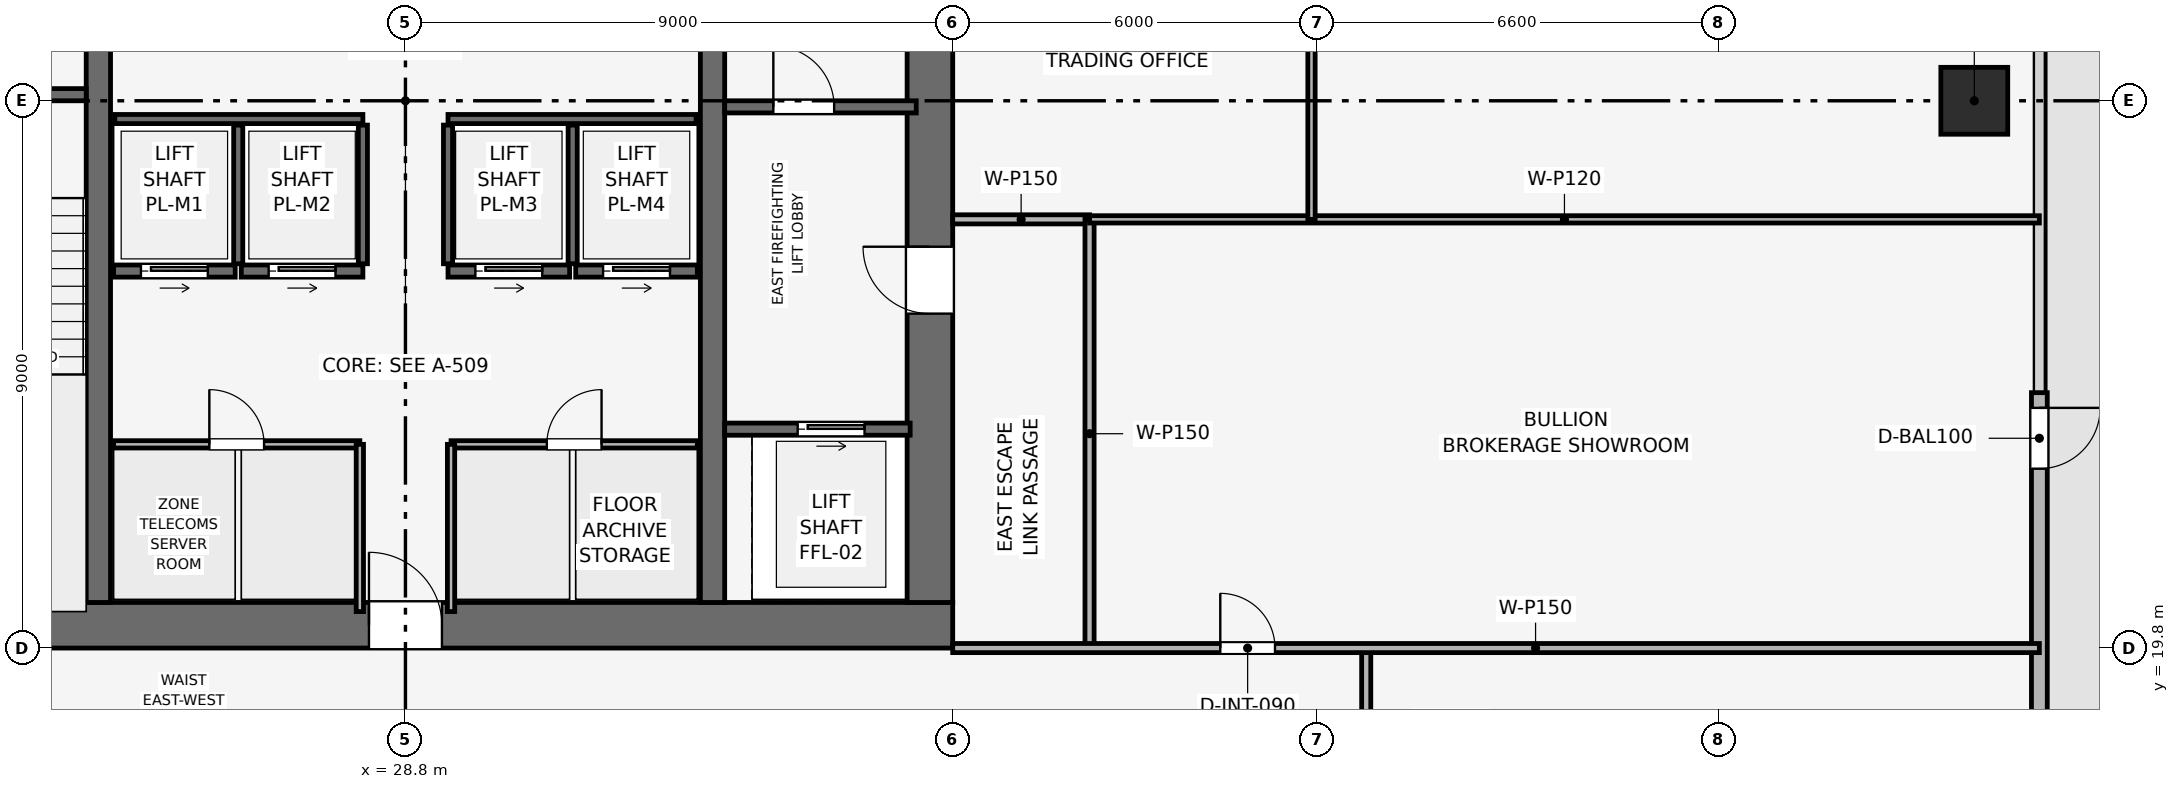
"""IFC4 building model, lengths in metres.
Left out: names, types, materials, properties, quantities, classifications, styles, units other than length and angle.
Written with IfcOpenShell. Run it as: python <this file> out.ifc"""

import sys

from ifc_helpers import new_model, si_unit, direction, frame, frame_2d, origin, origin_2d, place, context, subcontext, project, spatial, rectangle, extrude, element, fill, save


model = new_model("IFC4")
c1 = context("Model", 3, precision=1e-05, world=origin(), true_north=direction((0.0, 1.0)))
c2 = subcontext(c1, "Body", "Model", "MODEL_VIEW")
j1 = project(units=[si_unit("LENGTHUNIT", "METRE"), si_unit("PLANEANGLEUNIT", "RADIAN")], contexts=[c1])
p1 = place(None, origin())
s1 = spatial("IfcSite", under=j1, at=p1, CompositionType="ELEMENT")
p2 = place(p1, origin())
s2 = spatial("IfcBuilding", under=s1, at=p2, CompositionType="ELEMENT")
p3 = place(p2, frame((0.0, 0.0, 229.95)))
s3 = spatial("IfcBuildingStorey", under=s2, at=p3, CompositionType="ELEMENT", Elevation=229.95)
p4 = place(p3, frame((19.8, 20.175, 0.0), z_axis=(0.0, 0.0, 1.0), x_axis=(1.0, 0.0, 0.0)))
e1 = element("IfcWall", 1, at=p4, inside=s3, PredefinedType="SHEAR", context=c2, shape_type="SweptSolid", body=[
    extrude(rectangle(XDim=18.0, YDim=0.75, at=frame_2d((9.0, 0.0))), origin(), (0.0, 0.0, 1.0), 3.75),
])
p5 = place(p4, frame((8.4, 0.0, 0.0)))
e2 = element("IfcOpeningElement", 2, at=p5, cuts=e1, PredefinedType="OPENING", context=c2, shape_type="SweptSolid", body=[
    extrude(rectangle(XDim=1.2, YDim=2.2, at=frame_2d((0.6, 1.1))), frame((0.0, 0.385, 0.0), z_axis=(0.0, -1.0, 0.0), x_axis=(1.0, 0.0, 0.0)), (0.0, 0.0, 1.0), 0.77),
])
p6 = place(p3, frame((37.425, 20.55, 0.0), z_axis=(0.0, 0.0, 1.0), x_axis=(0.0, 1.0, 0.0)))
e3 = element("IfcWall", 3, at=p6, inside=s3, PredefinedType="SHEAR", context=c2, shape_type="SweptSolid", body=[
    extrude(rectangle(XDim=16.5, YDim=0.75, at=frame_2d((8.25, 0.0))), origin(), (0.0, 0.0, 1.0), 3.75),
])
p7 = place(p6, frame((4.75, 0.0, 0.0)))
e4 = element("IfcOpeningElement", 4, at=p7, cuts=e3, PredefinedType="OPENING", context=c2, shape_type="SweptSolid", body=[
    extrude(rectangle(XDim=1.1, YDim=2.15, at=frame_2d((0.55, 1.075))), frame((0.0, 0.385, 0.0), z_axis=(0.0, -1.0, 0.0), x_axis=(1.0, 0.0, 0.0)), (0.0, 0.0, 1.0), 0.77),
])
for number, where, z_axis, x_axis in (
    (5, (23.75, 20.55, 0.0), (0.0, 0.0, 1.0), (0.0, 1.0, 0.0)),
    (6, (33.85, 20.55, 0.0), (0.0, 0.0, 1.0), (0.0, 1.0, 0.0)),
):
    element("IfcWall", number, at=place(p3, frame(where, z_axis=z_axis, x_axis=x_axis)), inside=s3, PredefinedType="SHEAR", context=c2, shape_type="SweptSolid", body=[
        extrude(rectangle(XDim=16.5, YDim=0.4, at=frame_2d((8.25, 0.0))), origin(), (0.0, 0.0, 1.0), 3.75),
    ])
p8 = place(p3, frame((54.6, 28.8, 0.003), z_axis=(0.0, 0.0, 1.0), x_axis=(1.0, 0.0, 0.0)))
e7 = element("IfcColumn", 7, at=p8, inside=s3, PredefinedType="COLUMN", context=c2, shape_type="SweptSolid", body=[
    extrude(rectangle(XDim=1.1, YDim=1.1, at=origin_2d()), origin(), (0.0, 0.0, 1.0), 3.494),
])
p9 = place(p3, frame((55.67, 24.0, 0.0), z_axis=(0.0, 0.0, 1.0), x_axis=(0.0, -1.0, 0.0)))
e8 = element("IfcWall", 8, at=p9, inside=s3, PredefinedType="SOLIDWALL", context=c2, shape_type="SweptSolid", body=[
    extrude(rectangle(XDim=14.7, YDim=0.26, at=frame_2d((7.35, 0.0))), origin(), (0.0, 0.0, 1.0), 3.5),
])
p10 = place(p9, frame((0.25, 0.0, 0.0)))
e9 = element("IfcOpeningElement", 9, at=p10, cuts=e8, PredefinedType="OPENING", context=c2, shape_type="SweptSolid", body=[
    extrude(rectangle(XDim=1.0, YDim=2.2, at=frame_2d((0.5, 1.1))), frame((0.0, 0.14, 0.0), z_axis=(0.0, -1.0, 0.0), x_axis=(1.0, 0.0, 0.0)), (0.0, 0.0, 1.0), 0.28),
])
p11 = place(p3, frame((20.4, 28.9, 0.0), z_axis=(0.0, 0.0, 1.0), x_axis=(1.0, 0.0, 0.0)))
e10 = element("IfcWall", 10, at=p11, inside=s3, PredefinedType="SHEAR", context=c2, shape_type="SweptSolid", body=[
    extrude(rectangle(XDim=3.15, YDim=0.2, at=frame_2d((1.575, 0.0))), origin(), (0.0, 0.0, 1.0), 3.5),
])
p12 = place(p11, frame((0.8, 0.0, 0.0)))
e11 = element("IfcOpeningElement", 11, at=p12, cuts=e10, PredefinedType="OPENING", context=c2, shape_type="SweptSolid", body=[
    extrude(rectangle(XDim=1.0, YDim=2.1, at=frame_2d((0.5, 1.05))), frame((0.0, 0.11, 0.0), z_axis=(0.0, -1.0, 0.0), x_axis=(1.0, 0.0, 0.0)), (0.0, 0.0, 1.0), 0.22),
])
p13 = place(p3, frame((34.05, 28.7, 0.0), z_axis=(0.0, 0.0, 1.0), x_axis=(1.0, 0.0, 0.0)))
e12 = element("IfcWall", 12, at=p13, inside=s3, PredefinedType="SHEAR", context=c2, shape_type="SweptSolid", body=[
    extrude(rectangle(XDim=3.15, YDim=0.2, at=frame_2d((1.575, 0.0))), origin(), (0.0, 0.0, 1.0), 3.5),
])
p14 = place(p13, frame((0.8, 0.0, 0.0)))
e13 = element("IfcOpeningElement", 13, at=p14, cuts=e12, PredefinedType="OPENING", context=c2, shape_type="SweptSolid", body=[
    extrude(rectangle(XDim=1.0, YDim=2.1, at=frame_2d((0.5, 1.05))), frame((0.0, 0.11, 0.0), z_axis=(0.0, -1.0, 0.0), x_axis=(1.0, 0.0, 0.0)), (0.0, 0.0, 1.0), 0.22),
])
p15 = place(p3, frame((34.05, 23.4, 0.0), z_axis=(0.0, 0.0, 1.0), x_axis=(1.0, 0.0, 0.0)))
e14 = element("IfcWall", 14, at=p15, inside=s3, PredefinedType="SHEAR", context=c2, shape_type="SweptSolid", body=[
    extrude(rectangle(XDim=3.05, YDim=0.2, at=frame_2d((1.525, 0.0))), origin(), (0.0, 0.0, 1.0), 3.5),
])
p16 = place(p15, frame((1.2, 0.0, 0.0)))
e15 = element("IfcOpeningElement", 15, at=p16, cuts=e14, PredefinedType="OPENING", context=c2, shape_type="SweptSolid", body=[
    extrude(rectangle(XDim=1.1, YDim=2.15, at=frame_2d((0.55, 1.075))), frame((0.0, 0.11, 0.0), z_axis=(0.0, -1.0, 0.0), x_axis=(1.0, 0.0, 0.0)), (0.0, 0.0, 1.0), 0.22),
])
p17 = place(p3, frame((24.0, 26.0, 0.0), z_axis=(0.0, 0.0, 1.0), x_axis=(1.0, 0.0, 0.0)))
e16 = element("IfcWall", 16, at=p17, inside=s3, PredefinedType="SHEAR", context=c2, shape_type="SweptSolid", body=[
    extrude(rectangle(XDim=2.0, YDim=0.2, at=frame_2d((1.0, 0.0))), origin(), (0.0, 0.0, 1.0), 3.5),
])
p18 = place(p17, frame((0.45, 0.0, 0.0)))
e17 = element("IfcOpeningElement", 17, at=p18, cuts=e16, PredefinedType="OPENING", context=c2, shape_type="SweptSolid", body=[
    extrude(rectangle(XDim=1.1, YDim=2.15, at=frame_2d((0.55, 1.075))), frame((0.0, 0.11, 0.0), z_axis=(0.0, -1.0, 0.0), x_axis=(1.0, 0.0, 0.0)), (0.0, 0.0, 1.0), 0.22),
])
p19 = place(p3, frame((26.1, 26.0, 0.0), z_axis=(0.0, 0.0, 1.0), x_axis=(1.0, 0.0, 0.0)))
e18 = element("IfcWall", 18, at=p19, inside=s3, PredefinedType="SHEAR", context=c2, shape_type="SweptSolid", body=[
    extrude(rectangle(XDim=2.0, YDim=0.2, at=frame_2d((1.0, 0.0))), origin(), (0.0, 0.0, 1.0), 3.5),
])
p20 = place(p19, frame((0.45, 0.0, 0.0)))
e19 = element("IfcOpeningElement", 19, at=p20, cuts=e18, PredefinedType="OPENING", context=c2, shape_type="SweptSolid", body=[
    extrude(rectangle(XDim=1.1, YDim=2.15, at=frame_2d((0.55, 1.075))), frame((0.0, 0.11, 0.0), z_axis=(0.0, -1.0, 0.0), x_axis=(1.0, 0.0, 0.0)), (0.0, 0.0, 1.0), 0.22),
])
p21 = place(p3, frame((29.5, 26.0, 0.0), z_axis=(0.0, 0.0, 1.0), x_axis=(1.0, 0.0, 0.0)))
e20 = element("IfcWall", 20, at=p21, inside=s3, PredefinedType="SHEAR", context=c2, shape_type="SweptSolid", body=[
    extrude(rectangle(XDim=2.0, YDim=0.2, at=frame_2d((1.0, 0.0))), origin(), (0.0, 0.0, 1.0), 3.5),
])
p22 = place(p21, frame((0.45, 0.0, 0.0)))
e21 = element("IfcOpeningElement", 21, at=p22, cuts=e20, PredefinedType="OPENING", context=c2, shape_type="SweptSolid", body=[
    extrude(rectangle(XDim=1.1, YDim=2.15, at=frame_2d((0.55, 1.075))), frame((0.0, 0.11, 0.0), z_axis=(0.0, -1.0, 0.0), x_axis=(1.0, 0.0, 0.0)), (0.0, 0.0, 1.0), 0.22),
])
p23 = place(p3, frame((31.6, 26.0, 0.0), z_axis=(0.0, 0.0, 1.0), x_axis=(1.0, 0.0, 0.0)))
e22 = element("IfcWall", 22, at=p23, inside=s3, PredefinedType="SHEAR", context=c2, shape_type="SweptSolid", body=[
    extrude(rectangle(XDim=2.0, YDim=0.2, at=frame_2d((1.0, 0.0))), origin(), (0.0, 0.0, 1.0), 3.5),
])
p24 = place(p23, frame((0.45, 0.0, 0.0)))
e23 = element("IfcOpeningElement", 23, at=p24, cuts=e22, PredefinedType="OPENING", context=c2, shape_type="SweptSolid", body=[
    extrude(rectangle(XDim=1.1, YDim=2.15, at=frame_2d((0.55, 1.075))), frame((0.0, 0.11, 0.0), z_axis=(0.0, -1.0, 0.0), x_axis=(1.0, 0.0, 0.0)), (0.0, 0.0, 1.0), 0.22),
])
for number, where, z_axis, x_axis in (
    (24, (24.02, 28.5, 0.0), (0.0, 0.0, 1.0), (1.0, 0.0, 0.0)),
    (25, (29.5, 28.5, 0.0), (0.0, 0.0, 1.0), (1.0, 0.0, 0.0)),
):
    element("IfcWall", number, at=place(p3, frame(where, z_axis=z_axis, x_axis=x_axis)), inside=s3, PredefinedType="SHEAR", context=c2, shape_type="SweptSolid", body=[
        extrude(rectangle(XDim=4.08, YDim=0.15, at=frame_2d((2.04, 0.0))), origin(), (0.0, 0.0, 1.0), 3.5),
    ])
for number, where, z_axis, x_axis in (
    (26, (26.05, 26.12, 0.0), (0.0, 0.0, 1.0), (0.0, 1.0, 0.0)),
    (27, (28.1, 26.12, 0.0), (0.0, 0.0, 1.0), (0.0, 1.0, 0.0)),
    (28, (29.5, 26.12, 0.0), (0.0, 0.0, 1.0), (0.0, 1.0, 0.0)),
    (29, (31.55, 26.12, 0.0), (0.0, 0.0, 1.0), (0.0, 1.0, 0.0)),
):
    element("IfcWall", number, at=place(p3, frame(where, z_axis=z_axis, x_axis=x_axis)), inside=s3, PredefinedType="SHEAR", context=c2, shape_type="SweptSolid", body=[
        extrude(rectangle(XDim=2.28, YDim=0.15, at=frame_2d((1.14, 0.0))), origin(), (0.0, 0.0, 1.0), 3.5),
    ])
p25 = place(p3, frame((24.0, 23.15, 0.0), z_axis=(0.0, 0.0, 1.0), x_axis=(1.0, 0.0, 0.0)))
e30 = element("IfcWall", 30, at=p25, inside=s3, PredefinedType="PARTITIONING", context=c2, shape_type="SweptSolid", body=[
    extrude(rectangle(XDim=4.05, YDim=0.12, at=frame_2d((2.025, 0.0))), origin(), (0.0, 0.0, 1.0), 3.5),
])
p26 = place(p25, frame((1.575, 0.0, 0.0)))
e31 = element("IfcOpeningElement", 31, at=p26, cuts=e30, PredefinedType="OPENING", context=c2, shape_type="SweptSolid", body=[
    extrude(rectangle(XDim=0.9, YDim=2.1, at=frame_2d((0.45, 1.05))), frame((0.0, 0.07, 0.0), z_axis=(0.0, -1.0, 0.0), x_axis=(1.0, 0.0, 0.0)), (0.0, 0.0, 1.0), 0.14),
])
p27 = place(p3, frame((28.05, 20.4, 0.0), z_axis=(0.0, 0.0, 1.0), x_axis=(0.0, 1.0, 0.0)))
e32 = element("IfcWall", 32, at=p27, inside=s3, PredefinedType="PARTITIONING", context=c2, shape_type="SweptSolid", body=[
    extrude(rectangle(XDim=2.75, YDim=0.12, at=frame_2d((1.375, 0.0))), origin(), (0.0, 0.0, 1.0), 3.5),
])
p28 = place(p3, frame((29.55, 23.15, 0.0), z_axis=(0.0, 0.0, 1.0), x_axis=(1.0, 0.0, 0.0)))
e33 = element("IfcWall", 33, at=p28, inside=s3, PredefinedType="PARTITIONING", context=c2, shape_type="SweptSolid", body=[
    extrude(rectangle(XDim=4.05, YDim=0.12, at=frame_2d((2.025, 0.0))), origin(), (0.0, 0.0, 1.0), 3.5),
])
p29 = place(p28, frame((1.575, 0.0, 0.0)))
e34 = element("IfcOpeningElement", 34, at=p29, cuts=e33, PredefinedType="OPENING", context=c2, shape_type="SweptSolid", body=[
    extrude(rectangle(XDim=0.9, YDim=2.1, at=frame_2d((0.45, 1.05))), frame((0.0, 0.07, 0.0), z_axis=(0.0, -1.0, 0.0), x_axis=(1.0, 0.0, 0.0)), (0.0, 0.0, 1.0), 0.14),
])
p30 = place(p3, frame((29.55, 20.4, 0.0), z_axis=(0.0, 0.0, 1.0), x_axis=(0.0, 1.0, 0.0)))
e35 = element("IfcWall", 35, at=p30, inside=s3, PredefinedType="PARTITIONING", context=c2, shape_type="SweptSolid", body=[
    extrude(rectangle(XDim=2.75, YDim=0.12, at=frame_2d((1.375, 0.0))), origin(), (0.0, 0.0, 1.0), 3.5),
])
p31 = place(p3, frame((37.8, 26.85, 0.0), z_axis=(0.0, 0.0, 1.0), x_axis=(1.0, 0.0, 0.0)))
e36 = element("IfcWall", 36, at=p31, inside=s3, PredefinedType="PARTITIONING", context=c2, shape_type="SweptSolid", body=[
    extrude(rectangle(XDim=2.25, YDim=0.15, at=frame_2d((1.125, 0.0))), origin(), (0.0, 0.0, 1.0), 3.5),
])
p32 = place(p3, frame((40.05, 19.8, 0.0), z_axis=(0.0, 0.0, 1.0), x_axis=(0.0, 1.0, 0.0)))
e37 = element("IfcWall", 37, at=p32, inside=s3, PredefinedType="PARTITIONING", context=c2, shape_type="SweptSolid", body=[
    extrude(rectangle(XDim=7.05, YDim=0.15, at=frame_2d((3.525, 0.0))), origin(), (0.0, 0.0, 1.0), 3.035),
])
p33 = place(p3, frame((40.05, 26.85, 0.0), z_axis=(0.0, 0.0, 1.0), x_axis=(1.0, 0.0, 0.0)))
e38 = element("IfcWall", 38, at=p33, inside=s3, PredefinedType="PARTITIONING", context=c2, shape_type="SweptSolid", body=[
    extrude(rectangle(XDim=15.62, YDim=0.12, at=frame_2d((7.81, 0.0))), origin(), (0.0, 0.0, 1.0), 2.885),
])
p34 = place(p3, frame((43.7, 26.85, 0.0), z_axis=(0.0, 0.0, 1.0), x_axis=(0.0, 1.0, 0.0)))
e39 = element("IfcWall", 39, at=p34, inside=s3, PredefinedType="PARTITIONING", context=c2, shape_type="SweptSolid", body=[
    extrude(rectangle(XDim=10.95, YDim=0.12, at=frame_2d((5.475, 0.0))), origin(), (0.0, 0.0, 1.0), 3.035),
])
p35 = place(p34, frame((5.025, 0.0, 0.0)))
e40 = element("IfcOpeningElement", 40, at=p35, cuts=e39, PredefinedType="OPENING", context=c2, shape_type="SweptSolid", body=[
    extrude(rectangle(XDim=0.9, YDim=2.1, at=frame_2d((0.45, 1.05))), frame((0.0, 0.07, 0.0), z_axis=(0.0, -1.0, 0.0), x_axis=(1.0, 0.0, 0.0)), (0.0, 0.0, 1.0), 0.14),
])
p36 = place(p3, frame((44.6, 17.4, 0.0), z_axis=(0.0, 0.0, 1.0), x_axis=(0.0, 1.0, 0.0)))
e41 = element("IfcWall", 41, at=p36, inside=s3, PredefinedType="PARTITIONING", context=c2, shape_type="SweptSolid", body=[
    extrude(rectangle(XDim=2.4, YDim=0.15, at=frame_2d((1.2, 0.0))), origin(), (0.0, 0.0, 1.0), 3.5),
])
p37 = place(p3, frame((37.8, 19.8, 0.0), z_axis=(0.0, 0.0, 1.0), x_axis=(1.0, 0.0, 0.0)))
e42 = element("IfcWall", 42, at=p37, inside=s3, PredefinedType="PARTITIONING", context=c2, shape_type="SweptSolid", body=[
    extrude(rectangle(XDim=17.87, YDim=0.15, at=frame_2d((8.935, 0.0))), origin(), (0.0, 0.0, 1.0), 2.885),
])
p38 = place(p37, frame((4.4, 0.0, 0.0)))
e43 = element("IfcOpeningElement", 43, at=p38, cuts=e42, PredefinedType="OPENING", context=c2, shape_type="SweptSolid", body=[
    extrude(rectangle(XDim=0.9, YDim=2.1, at=frame_2d((0.45, 1.05))), frame((0.0, 0.085, 0.0), z_axis=(0.0, -1.0, 0.0), x_axis=(1.0, 0.0, 0.0)), (0.0, 0.0, 1.0), 0.17),
])
p39 = place(p10, origin())
e44 = element("IfcDoor", 44, at=p39, inside=s3, OperationType="SINGLE_SWING_LEFT", PredefinedType="DOOR", context=c2, shape_type="SweptSolid", body=[
    extrude(rectangle(XDim=1.0, YDim=2.2, at=frame_2d((0.5, 1.1))), frame((0.0, 0.025, 0.0), z_axis=(0.0, -1.0, 0.0), x_axis=(1.0, 0.0, 0.0)), (0.0, 0.0, 1.0), 0.05),
])
fill(e9, e44)
p40 = place(p14, origin())
e45 = element("IfcDoor", 45, at=p40, inside=s3, OperationType="SINGLE_SWING_LEFT", PredefinedType="DOOR", context=c2, shape_type="SweptSolid", body=[
    extrude(rectangle(XDim=1.0, YDim=2.1, at=frame_2d((0.5, 1.05))), frame((0.0, 0.025, 0.0), z_axis=(0.0, -1.0, 0.0), x_axis=(1.0, 0.0, 0.0)), (0.0, 0.0, 1.0), 0.05),
])
fill(e13, e45)
p41 = place(p16, origin())
e46 = element("IfcDoor", 46, at=p41, inside=s3, OperationType="SLIDING_TO_RIGHT", PredefinedType="DOOR", context=c2, shape_type="SweptSolid", body=[
    extrude(rectangle(XDim=1.1, YDim=2.15, at=frame_2d((0.55, 1.075))), frame((0.0, 0.025, 0.0), z_axis=(0.0, -1.0, 0.0), x_axis=(1.0, 0.0, 0.0)), (0.0, 0.0, 1.0), 0.05),
])
fill(e15, e46)
p42 = place(p18, origin())
e47 = element("IfcDoor", 47, at=p42, inside=s3, OperationType="SLIDING_TO_RIGHT", PredefinedType="DOOR", context=c2, shape_type="SweptSolid", body=[
    extrude(rectangle(XDim=1.1, YDim=2.15, at=frame_2d((0.55, 1.075))), frame((0.0, 0.025, 0.0), z_axis=(0.0, -1.0, 0.0), x_axis=(1.0, 0.0, 0.0)), (0.0, 0.0, 1.0), 0.05),
])
fill(e17, e47)
p43 = place(p20, origin())
e48 = element("IfcDoor", 48, at=p43, inside=s3, OperationType="SLIDING_TO_RIGHT", PredefinedType="DOOR", context=c2, shape_type="SweptSolid", body=[
    extrude(rectangle(XDim=1.1, YDim=2.15, at=frame_2d((0.55, 1.075))), frame((0.0, 0.025, 0.0), z_axis=(0.0, -1.0, 0.0), x_axis=(1.0, 0.0, 0.0)), (0.0, 0.0, 1.0), 0.05),
])
fill(e19, e48)
p44 = place(p22, origin())
e49 = element("IfcDoor", 49, at=p44, inside=s3, OperationType="SLIDING_TO_RIGHT", PredefinedType="DOOR", context=c2, shape_type="SweptSolid", body=[
    extrude(rectangle(XDim=1.1, YDim=2.15, at=frame_2d((0.55, 1.075))), frame((0.0, 0.025, 0.0), z_axis=(0.0, -1.0, 0.0), x_axis=(1.0, 0.0, 0.0)), (0.0, 0.0, 1.0), 0.05),
])
fill(e21, e49)
p45 = place(p24, origin())
e50 = element("IfcDoor", 50, at=p45, inside=s3, OperationType="SLIDING_TO_RIGHT", PredefinedType="DOOR", context=c2, shape_type="SweptSolid", body=[
    extrude(rectangle(XDim=1.1, YDim=2.15, at=frame_2d((0.55, 1.075))), frame((0.0, 0.025, 0.0), z_axis=(0.0, -1.0, 0.0), x_axis=(1.0, 0.0, 0.0)), (0.0, 0.0, 1.0), 0.05),
])
fill(e23, e50)
p46 = place(p26, origin())
e51 = element("IfcDoor", 51, at=p46, inside=s3, OperationType="SINGLE_SWING_LEFT", PredefinedType="DOOR", context=c2, shape_type="SweptSolid", body=[
    extrude(rectangle(XDim=0.9, YDim=2.1, at=frame_2d((0.45, 1.05))), frame((0.0, 0.025, 0.0), z_axis=(0.0, -1.0, 0.0), x_axis=(1.0, 0.0, 0.0)), (0.0, 0.0, 1.0), 0.05),
])
fill(e31, e51)
p47 = place(p29, origin())
e52 = element("IfcDoor", 52, at=p47, inside=s3, OperationType="SINGLE_SWING_RIGHT", PredefinedType="DOOR", context=c2, shape_type="SweptSolid", body=[
    extrude(rectangle(XDim=0.9, YDim=2.1, at=frame_2d((0.45, 1.05))), frame((0.0, 0.025, 0.0), z_axis=(0.0, -1.0, 0.0), x_axis=(1.0, 0.0, 0.0)), (0.0, 0.0, 1.0), 0.05),
])
fill(e34, e52)
p48 = place(p38, origin())
e53 = element("IfcDoor", 53, at=p48, inside=s3, OperationType="SINGLE_SWING_LEFT", PredefinedType="DOOR", context=c2, shape_type="SweptSolid", body=[
    extrude(rectangle(XDim=0.9, YDim=2.1, at=frame_2d((0.45, 1.05))), frame((0.0, 0.025, 0.0), z_axis=(0.0, -1.0, 0.0), x_axis=(1.0, 0.0, 0.0)), (0.0, 0.0, 1.0), 0.05),
])
fill(e43, e53)
p49 = place(p7, origin())
e54 = element("IfcDoor", 54, at=p49, inside=s3, OperationType="SINGLE_SWING_RIGHT", PredefinedType="DOOR", context=c2, shape_type="SweptSolid", body=[
    extrude(rectangle(XDim=1.1, YDim=2.15, at=frame_2d((0.55, 1.075))), frame((0.0, 0.025, 0.0), z_axis=(0.0, -1.0, 0.0), x_axis=(1.0, 0.0, 0.0)), (0.0, 0.0, 1.0), 0.05),
])
fill(e4, e54)
p50 = place(p5, origin())
e55 = element("IfcDoor", 55, at=p50, inside=s3, OperationType="SINGLE_SWING_LEFT", PredefinedType="DOOR", context=c2, shape_type="SweptSolid", body=[
    extrude(rectangle(XDim=1.2, YDim=2.2, at=frame_2d((0.6, 1.1))), frame((0.0, 0.025, 0.0), z_axis=(0.0, -1.0, 0.0), x_axis=(1.0, 0.0, 0.0)), (0.0, 0.0, 1.0), 0.05),
])
fill(e2, e55)
save(model, sys.argv[1])
